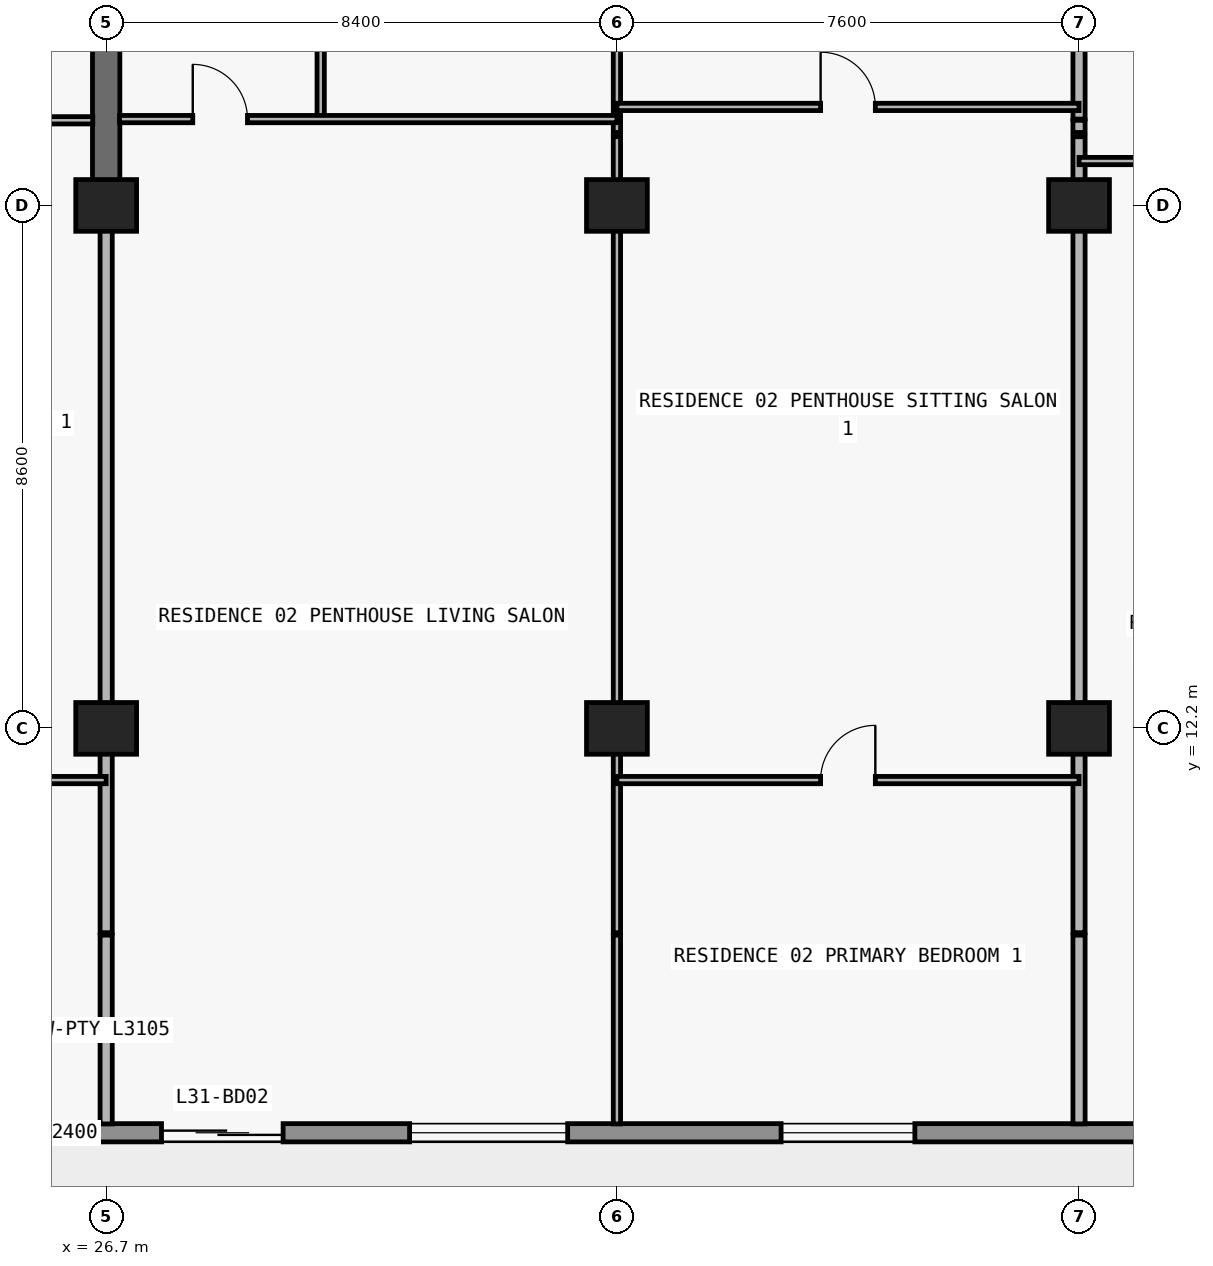
"""IFC4 building model, lengths in metres.
Left out: names, types, materials, properties, quantities, classifications, styles, units other than length and angle.
Written with IfcOpenShell. Run it as: python <this file> out.ifc"""

import sys

from ifc_helpers import new_model, si_unit, direction, frame, frame_2d, origin, origin_2d, place, context, subcontext, project, spatial, rectangle, extrude, element, fill, save


model = new_model("IFC4")
c1 = context("Model", 3, precision=1e-05, world=origin(), true_north=direction((0.0, 1.0)))
c2 = subcontext(c1, "Body", "Model", "MODEL_VIEW")
j1 = project(units=[si_unit("LENGTHUNIT", "METRE"), si_unit("PLANEANGLEUNIT", "RADIAN")], contexts=[c1])
p1 = place(None, origin())
s1 = spatial("IfcSite", under=j1, at=p1, CompositionType="ELEMENT")
p2 = place(p1, origin())
s2 = spatial("IfcBuilding", under=s1, at=p2, CompositionType="ELEMENT")
p3 = place(p2, frame((0.0, 0.0, 115.8)))
s3 = spatial("IfcBuildingStorey", under=s2, at=p3, CompositionType="ELEMENT", Elevation=115.8)
for number, where, z_axis, x_axis in (
    (1, (26.7, 12.2, 0.0), (0.0, 0.0, 1.0), (1.0, 0.0, 0.0)),
    (2, (35.1, 12.2, 0.0), (0.0, 0.0, 1.0), (1.0, 0.0, 0.0)),
    (3, (42.7, 12.2, 0.0), (0.0, 0.0, 1.0), (1.0, 0.0, 0.0)),
    (4, (26.7, 20.8, 0.0), (0.0, 0.0, 1.0), (1.0, 0.0, 0.0)),
    (5, (35.1, 20.8, 0.0), (0.0, 0.0, 1.0), (1.0, 0.0, 0.0)),
    (6, (42.7, 20.8, 0.0), (0.0, 0.0, 1.0), (1.0, 0.0, 0.0)),
):
    element("IfcColumn", number, at=place(p3, frame(where, z_axis=z_axis, x_axis=x_axis)), inside=s3, PredefinedType="COLUMN", context=c2, shape_type="SweptSolid", body=[
        extrude(rectangle(XDim=1.0, YDim=0.85, at=origin_2d()), origin(), (0.0, 0.0, 1.0), 3.05),
    ])
p4 = place(p3, frame((26.7, 20.8, 0.0), z_axis=(0.0, 0.0, 1.0), x_axis=(0.0, 1.0, 0.0)))
e7 = element("IfcWall", 7, at=p4, inside=s3, PredefinedType="SHEAR", context=c2, shape_type="SweptSolid", body=[
    extrude(rectangle(XDim=8.6, YDim=0.45, at=frame_2d((4.3, 0.0))), origin(), (0.0, 0.0, 1.0), 3.05),
])
p5 = place(p3, frame((70.1, 5.55, 0.0), z_axis=(0.0, 0.0, 1.0), x_axis=(-1.0, 0.0, 0.0)))
e8 = element("IfcWall", 8, at=p5, inside=s3, PredefinedType="STANDARD", context=c2, shape_type="SweptSolid", body=[
    extrude(rectangle(XDim=62.4, YDim=0.3, at=frame_2d((31.2, 0.0))), origin(), (0.0, 0.0, 1.0), 3.05),
])
p6 = place(p5, frame((57.29, 0.0, 0.0)))
e9 = element("IfcOpeningElement", 9, at=p6, cuts=e8, PredefinedType="OPENING", context=c2, shape_type="SweptSolid", body=[
    extrude(rectangle(XDim=2.0, YDim=2.3, at=frame_2d((1.0, 1.15))), frame((0.0, 0.16, 0.0), z_axis=(0.0, -1.0, 0.0), x_axis=(1.0, 0.0, 0.0)), (0.0, 0.0, 1.0), 0.32),
])
p7 = place(p5, frame((52.61, 0.0, 0.65)))
e10 = element("IfcOpeningElement", 10, at=p7, cuts=e8, PredefinedType="OPENING", context=c2, shape_type="SweptSolid", body=[
    extrude(rectangle(XDim=2.6, YDim=1.85, at=frame_2d((1.3, 0.925))), frame((0.0, 0.16, 0.0), z_axis=(0.0, -1.0, 0.0), x_axis=(1.0, 0.0, 0.0)), (0.0, 0.0, 1.0), 0.32),
])
p8 = place(p5, frame((46.5, 0.0, 0.85)))
e11 = element("IfcOpeningElement", 11, at=p8, cuts=e8, PredefinedType="OPENING", context=c2, shape_type="SweptSolid", body=[
    extrude(rectangle(XDim=2.2, YDim=1.55, at=frame_2d((1.1, 0.775))), frame((0.0, 0.16, 0.0), z_axis=(0.0, -1.0, 0.0), x_axis=(1.0, 0.0, 0.0)), (0.0, 0.0, 1.0), 0.32),
])
p9 = place(p5, frame((40.49, 0.0, 0.0)))
e12 = element("IfcOpeningElement", 12, at=p9, cuts=e8, PredefinedType="OPENING", context=c2, shape_type="SweptSolid", body=[
    extrude(rectangle(XDim=2.0, YDim=2.3, at=frame_2d((1.0, 1.15))), frame((0.0, 0.16, 0.0), z_axis=(0.0, -1.0, 0.0), x_axis=(1.0, 0.0, 0.0)), (0.0, 0.0, 1.0), 0.32),
])
p10 = place(p5, frame((35.81, 0.0, 0.65)))
e13 = element("IfcOpeningElement", 13, at=p10, cuts=e8, PredefinedType="OPENING", context=c2, shape_type="SweptSolid", body=[
    extrude(rectangle(XDim=2.6, YDim=1.85, at=frame_2d((1.3, 0.925))), frame((0.0, 0.16, 0.0), z_axis=(0.0, -1.0, 0.0), x_axis=(1.0, 0.0, 0.0)), (0.0, 0.0, 1.0), 0.32),
])
p11 = place(p5, frame((30.1, 0.0, 0.85)))
e14 = element("IfcOpeningElement", 14, at=p11, cuts=e8, PredefinedType="OPENING", context=c2, shape_type="SweptSolid", body=[
    extrude(rectangle(XDim=2.2, YDim=1.55, at=frame_2d((1.1, 0.775))), frame((0.0, 0.16, 0.0), z_axis=(0.0, -1.0, 0.0), x_axis=(1.0, 0.0, 0.0)), (0.0, 0.0, 1.0), 0.32),
])
p12 = place(p5, frame((24.426, 0.0, 0.0)))
e15 = element("IfcOpeningElement", 15, at=p12, cuts=e8, PredefinedType="OPENING", context=c2, shape_type="SweptSolid", body=[
    extrude(rectangle(XDim=2.0, YDim=2.3, at=frame_2d((1.0, 1.15))), frame((0.0, 0.16, 0.0), z_axis=(0.0, -1.0, 0.0), x_axis=(1.0, 0.0, 0.0)), (0.0, 0.0, 1.0), 0.32),
])
p13 = place(p5, frame((20.126, 0.0, 0.85)))
e16 = element("IfcOpeningElement", 16, at=p13, cuts=e8, PredefinedType="OPENING", context=c2, shape_type="SweptSolid", body=[
    extrude(rectangle(XDim=2.2, YDim=1.55, at=frame_2d((1.1, 0.775))), frame((0.0, 0.16, 0.0), z_axis=(0.0, -1.0, 0.0), x_axis=(1.0, 0.0, 0.0)), (0.0, 0.0, 1.0), 0.32),
])
p14 = place(p5, frame((15.69, 0.0, 0.0)))
e17 = element("IfcOpeningElement", 17, at=p14, cuts=e8, PredefinedType="OPENING", context=c2, shape_type="SweptSolid", body=[
    extrude(rectangle(XDim=2.0, YDim=2.3, at=frame_2d((1.0, 1.15))), frame((0.0, 0.16, 0.0), z_axis=(0.0, -1.0, 0.0), x_axis=(1.0, 0.0, 0.0)), (0.0, 0.0, 1.0), 0.32),
])
p15 = place(p5, frame((11.59, 0.0, 0.85)))
e18 = element("IfcOpeningElement", 18, at=p15, cuts=e8, PredefinedType="OPENING", context=c2, shape_type="SweptSolid", body=[
    extrude(rectangle(XDim=1.8, YDim=1.55, at=frame_2d((0.9, 0.775))), frame((0.0, 0.16, 0.0), z_axis=(0.0, -1.0, 0.0), x_axis=(1.0, 0.0, 0.0)), (0.0, 0.0, 1.0), 0.32),
])
p16 = place(p5, frame((7.626, 0.0, 0.0)))
e19 = element("IfcOpeningElement", 19, at=p16, cuts=e8, PredefinedType="OPENING", context=c2, shape_type="SweptSolid", body=[
    extrude(rectangle(XDim=2.0, YDim=2.3, at=frame_2d((1.0, 1.15))), frame((0.0, 0.16, 0.0), z_axis=(0.0, -1.0, 0.0), x_axis=(1.0, 0.0, 0.0)), (0.0, 0.0, 1.0), 0.32),
])
p17 = place(p5, frame((3.326, 0.0, 0.85)))
e20 = element("IfcOpeningElement", 20, at=p17, cuts=e8, PredefinedType="OPENING", context=c2, shape_type="SweptSolid", body=[
    extrude(rectangle(XDim=2.2, YDim=1.55, at=frame_2d((1.1, 0.775))), frame((0.0, 0.16, 0.0), z_axis=(0.0, -1.0, 0.0), x_axis=(1.0, 0.0, 0.0)), (0.0, 0.0, 1.0), 0.32),
])
p18 = place(p3, frame((26.7, 5.695, 0.0), z_axis=(0.0, 0.0, 1.0), x_axis=(0.0, 1.0, 0.0)))
e21 = element("IfcWall", 21, at=p18, inside=s3, PredefinedType="PARTITIONING", context=c2, shape_type="SweptSolid", body=[
    extrude(rectangle(XDim=3.105, YDim=0.2, at=frame_2d((1.552, 0.0))), origin(), (0.0, 0.0, 1.0), 3.05),
])
p19 = place(p3, frame((26.7, 8.84, 0.0), z_axis=(0.0, 0.0, 1.0), x_axis=(0.0, 1.0, 0.0)))
e22 = element("IfcWall", 22, at=p19, inside=s3, PredefinedType="PARTITIONING", context=c2, shape_type="SweptSolid", body=[
    extrude(rectangle(XDim=11.955, YDim=0.2, at=frame_2d((5.978, 0.0))), origin(), (0.0, 0.0, 1.0), 2.174),
])
p20 = place(p3, frame((30.228, 22.22, 0.0), z_axis=(0.0, 0.0, 1.0), x_axis=(0.0, 1.0, 0.0)))
e23 = element("IfcWall", 23, at=p20, inside=s3, PredefinedType="PARTITIONING", context=c2, shape_type="SweptSolid", body=[
    extrude(rectangle(XDim=4.38, YDim=0.12, at=frame_2d((2.19, 0.0))), origin(), (0.0, 0.0, 1.0), 3.05),
])
p21 = place(p20, frame((1.74, 0.0, 0.0)))
e24 = element("IfcOpeningElement", 24, at=p21, cuts=e23, PredefinedType="OPENING", context=c2, shape_type="SweptSolid", body=[
    extrude(rectangle(XDim=0.9, YDim=2.15, at=frame_2d((0.45, 1.075))), frame((0.0, 0.07, 0.0), z_axis=(0.0, -1.0, 0.0), x_axis=(1.0, 0.0, 0.0)), (0.0, 0.0, 1.0), 0.14),
])
p22 = place(p3, frame((35.1, 5.695, 0.0), z_axis=(0.0, 0.0, 1.0), x_axis=(0.0, 1.0, 0.0)))
e25 = element("IfcWall", 25, at=p22, inside=s3, PredefinedType="PARTITIONING", context=c2, shape_type="SweptSolid", body=[
    extrude(rectangle(XDim=3.105, YDim=0.12, at=frame_2d((1.552, 0.0))), origin(), (0.0, 0.0, 1.0), 3.05),
])
p23 = place(p3, frame((35.1, 8.84, 0.0), z_axis=(0.0, 0.0, 1.0), x_axis=(0.0, 1.0, 0.0)))
e26 = element("IfcWall", 26, at=p23, inside=s3, PredefinedType="PARTITIONING", context=c2, shape_type="SweptSolid", body=[
    extrude(rectangle(XDim=13.09, YDim=0.12, at=frame_2d((6.545, 0.0))), origin(), (0.0, 0.0, 1.0), 2.174),
])
p24 = place(p3, frame((35.1, 22.0, 0.0), z_axis=(0.0, 0.0, 1.0), x_axis=(0.0, 1.0, 0.0)))
e27 = element("IfcWall", 27, at=p24, inside=s3, PredefinedType="PARTITIONING", context=c2, shape_type="SweptSolid", body=[
    extrude(rectangle(XDim=0.2, YDim=0.12, at=frame_2d((0.1, 0.0))), origin(), (0.0, 0.0, 1.0), 2.174),
])
p25 = place(p3, frame((35.1, 22.22, 0.0), z_axis=(0.0, 0.0, 1.0), x_axis=(0.0, 1.0, 0.0)))
e28 = element("IfcWall", 28, at=p25, inside=s3, PredefinedType="PARTITIONING", context=c2, shape_type="SweptSolid", body=[
    extrude(rectangle(XDim=4.38, YDim=0.12, at=frame_2d((2.19, 0.0))), origin(), (0.0, 0.0, 1.0), 2.174),
])
p26 = place(p25, frame((1.84, 0.0, 0.0)))
e29 = element("IfcOpeningElement", 29, at=p26, cuts=e28, PredefinedType="OPENING", context=c2, shape_type="SweptSolid", body=[
    extrude(rectangle(XDim=0.9, YDim=2.124, at=frame_2d((0.45, 1.062))), frame((0.0, 0.07, 0.0), z_axis=(0.0, -1.0, 0.0), x_axis=(1.0, 0.0, 0.0)), (0.0, 0.0, 1.0), 0.14),
])
p27 = place(p3, frame((42.7, 5.695, 0.0), z_axis=(0.0, 0.0, 1.0), x_axis=(0.0, 1.0, 0.0)))
e30 = element("IfcWall", 30, at=p27, inside=s3, PredefinedType="PARTITIONING", context=c2, shape_type="SweptSolid", body=[
    extrude(rectangle(XDim=3.105, YDim=0.2, at=frame_2d((1.552, 0.0))), origin(), (0.0, 0.0, 1.0), 3.05),
])
p28 = place(p3, frame((42.7, 8.84, 0.0), z_axis=(0.0, 0.0, 1.0), x_axis=(0.0, 1.0, 0.0)))
e31 = element("IfcWall", 31, at=p28, inside=s3, PredefinedType="PARTITIONING", context=c2, shape_type="SweptSolid", body=[
    extrude(rectangle(XDim=13.09, YDim=0.2, at=frame_2d((6.545, 0.0))), origin(), (0.0, 0.0, 1.0), 2.174),
])
p29 = place(p3, frame((42.7, 22.0, 0.0), z_axis=(0.0, 0.0, 1.0), x_axis=(0.0, 1.0, 0.0)))
e32 = element("IfcWall", 32, at=p29, inside=s3, PredefinedType="PARTITIONING", context=c2, shape_type="SweptSolid", body=[
    extrude(rectangle(XDim=0.2, YDim=0.2, at=frame_2d((0.1, 0.0))), origin(), (0.0, 0.0, 1.0), 2.174),
])
p30 = place(p3, frame((42.7, 22.22, 0.0), z_axis=(0.0, 0.0, 1.0), x_axis=(0.0, 1.0, 0.0)))
e33 = element("IfcWall", 33, at=p30, inside=s3, PredefinedType="PARTITIONING", context=c2, shape_type="SweptSolid", body=[
    extrude(rectangle(XDim=4.38, YDim=0.2, at=frame_2d((2.19, 0.0))), origin(), (0.0, 0.0, 1.0), 2.174),
])
p31 = place(p3, frame((18.3, 11.35, 0.0), z_axis=(0.0, 0.0, 1.0), x_axis=(1.0, 0.0, 0.0)))
e34 = element("IfcWall", 34, at=p31, inside=s3, PredefinedType="PARTITIONING", context=c2, shape_type="SweptSolid", body=[
    extrude(rectangle(XDim=8.4, YDim=0.12, at=frame_2d((4.2, 0.0))), origin(), (0.0, 0.0, 1.0), 3.05),
])
p32 = place(p31, frame((3.75, 0.0, 0.0)))
e35 = element("IfcOpeningElement", 35, at=p32, cuts=e34, PredefinedType="OPENING", context=c2, shape_type="SweptSolid", body=[
    extrude(rectangle(XDim=0.9, YDim=2.15, at=frame_2d((0.45, 1.075))), frame((0.0, 0.07, 0.0), z_axis=(0.0, -1.0, 0.0), x_axis=(1.0, 0.0, 0.0)), (0.0, 0.0, 1.0), 0.14),
])
p33 = place(p3, frame((35.1, 11.35, 0.0), z_axis=(0.0, 0.0, 1.0), x_axis=(1.0, 0.0, 0.0)))
e36 = element("IfcWall", 36, at=p33, inside=s3, PredefinedType="PARTITIONING", context=c2, shape_type="SweptSolid", body=[
    extrude(rectangle(XDim=7.6, YDim=0.12, at=frame_2d((3.8, 0.0))), origin(), (0.0, 0.0, 1.0), 3.05),
])
p34 = place(p33, frame((3.35, 0.0, 0.0)))
e37 = element("IfcOpeningElement", 37, at=p34, cuts=e36, PredefinedType="OPENING", context=c2, shape_type="SweptSolid", body=[
    extrude(rectangle(XDim=0.9, YDim=2.15, at=frame_2d((0.45, 1.075))), frame((0.0, 0.07, 0.0), z_axis=(0.0, -1.0, 0.0), x_axis=(1.0, 0.0, 0.0)), (0.0, 0.0, 1.0), 0.14),
])
p35 = place(p3, frame((42.7, 21.53, 0.0), z_axis=(0.0, 0.0, 1.0), x_axis=(1.0, 0.0, 0.0)))
e38 = element("IfcWall", 38, at=p35, inside=s3, PredefinedType="PARTITIONING", context=c2, shape_type="SweptSolid", body=[
    extrude(rectangle(XDim=8.18, YDim=0.12, at=frame_2d((4.09, 0.0))), origin(), (0.0, 0.0, 1.0), 3.05),
])
p36 = place(p35, frame((1.524, 0.0, 0.0)))
e39 = element("IfcOpeningElement", 39, at=p36, cuts=e38, PredefinedType="OPENING", context=c2, shape_type="SweptSolid", body=[
    extrude(rectangle(XDim=0.9, YDim=2.15, at=frame_2d((0.45, 1.075))), frame((0.0, 0.07, 0.0), z_axis=(0.0, -1.0, 0.0), x_axis=(1.0, 0.0, 0.0)), (0.0, 0.0, 1.0), 0.14),
])
p37 = place(p35, frame((5.783, 0.0, 0.0)))
e40 = element("IfcOpeningElement", 40, at=p37, cuts=e38, PredefinedType="OPENING", context=c2, shape_type="SweptSolid", body=[
    extrude(rectangle(XDim=0.9, YDim=2.15, at=frame_2d((0.45, 1.075))), frame((0.0, 0.07, 0.0), z_axis=(0.0, -1.0, 0.0), x_axis=(1.0, 0.0, 0.0)), (0.0, 0.0, 1.0), 0.14),
])
p38 = place(p3, frame((18.3, 22.2, 0.0), z_axis=(0.0, 0.0, 1.0), x_axis=(1.0, 0.0, 0.0)))
e41 = element("IfcWall", 41, at=p38, inside=s3, PredefinedType="PARTITIONING", context=c2, shape_type="SweptSolid", body=[
    extrude(rectangle(XDim=8.18, YDim=0.12, at=frame_2d((4.09, 0.0))), origin(), (0.0, 0.0, 1.0), 3.05),
])
p39 = place(p38, frame((3.64, 0.0, 0.0)))
e42 = element("IfcOpeningElement", 42, at=p39, cuts=e41, PredefinedType="OPENING", context=c2, shape_type="SweptSolid", body=[
    extrude(rectangle(XDim=0.9, YDim=2.15, at=frame_2d((0.45, 1.075))), frame((0.0, 0.07, 0.0), z_axis=(0.0, -1.0, 0.0), x_axis=(1.0, 0.0, 0.0)), (0.0, 0.0, 1.0), 0.14),
])
p40 = place(p3, frame((26.92, 22.22, 0.0), z_axis=(0.0, 0.0, 1.0), x_axis=(1.0, 0.0, 0.0)))
e43 = element("IfcWall", 43, at=p40, inside=s3, PredefinedType="PARTITIONING", context=c2, shape_type="SweptSolid", body=[
    extrude(rectangle(XDim=8.18, YDim=0.12, at=frame_2d((4.09, 0.0))), origin(), (0.0, 0.0, 1.0), 3.05),
])
p41 = place(p40, frame((1.204, 0.0, 0.0)))
e44 = element("IfcOpeningElement", 44, at=p41, cuts=e43, PredefinedType="OPENING", context=c2, shape_type="SweptSolid", body=[
    extrude(rectangle(XDim=0.9, YDim=2.15, at=frame_2d((0.45, 1.075))), frame((0.0, 0.07, 0.0), z_axis=(0.0, -1.0, 0.0), x_axis=(1.0, 0.0, 0.0)), (0.0, 0.0, 1.0), 0.14),
])
p42 = place(p3, frame((35.1, 22.42, 0.0), z_axis=(0.0, 0.0, 1.0), x_axis=(1.0, 0.0, 0.0)))
e45 = element("IfcWall", 45, at=p42, inside=s3, PredefinedType="PARTITIONING", context=c2, shape_type="SweptSolid", body=[
    extrude(rectangle(XDim=7.6, YDim=0.12, at=frame_2d((3.8, 0.0))), origin(), (0.0, 0.0, 1.0), 3.05),
])
p43 = place(p42, frame((3.35, 0.0, 0.0)))
e46 = element("IfcOpeningElement", 46, at=p43, cuts=e45, PredefinedType="OPENING", context=c2, shape_type="SweptSolid", body=[
    extrude(rectangle(XDim=0.9, YDim=2.15, at=frame_2d((0.45, 1.075))), frame((0.0, 0.07, 0.0), z_axis=(0.0, -1.0, 0.0), x_axis=(1.0, 0.0, 0.0)), (0.0, 0.0, 1.0), 0.14),
])
p44 = place(p9, origin())
e47 = element("IfcDoor", 47, at=p44, inside=s3, OperationType="DOUBLE_DOOR_SLIDING", PredefinedType="DOOR", context=c2, shape_type="SweptSolid", body=[
    extrude(rectangle(XDim=2.0, YDim=2.3, at=frame_2d((1.0, 1.15))), frame((0.0, 0.025, 0.0), z_axis=(0.0, -1.0, 0.0), x_axis=(1.0, 0.0, 0.0)), (0.0, 0.0, 1.0), 0.05),
])
fill(e12, e47)
p45 = place(p10, origin())
e48 = element("IfcWindow", 48, at=p45, inside=s3, PartitioningType="SINGLE_PANEL", PredefinedType="WINDOW", context=c2, shape_type="SweptSolid", body=[
    extrude(rectangle(XDim=2.6, YDim=1.85, at=frame_2d((1.3, 0.925))), frame((0.0, 0.03, 0.0), z_axis=(0.0, -1.0, 0.0), x_axis=(1.0, 0.0, 0.0)), (0.0, 0.0, 1.0), 0.06),
])
fill(e13, e48)
p46 = place(p11, origin())
e49 = element("IfcWindow", 49, at=p46, inside=s3, PartitioningType="SINGLE_PANEL", PredefinedType="WINDOW", context=c2, shape_type="SweptSolid", body=[
    extrude(rectangle(XDim=2.2, YDim=1.55, at=frame_2d((1.1, 0.775))), frame((0.0, 0.03, 0.0), z_axis=(0.0, -1.0, 0.0), x_axis=(1.0, 0.0, 0.0)), (0.0, 0.0, 1.0), 0.06),
])
fill(e14, e49)
p47 = place(p41, origin())
e50 = element("IfcDoor", 50, at=p47, inside=s3, OperationType="SINGLE_SWING_LEFT", PredefinedType="DOOR", context=c2, shape_type="SweptSolid", body=[
    extrude(rectangle(XDim=0.9, YDim=2.15, at=frame_2d((0.45, 1.075))), frame((0.0, 0.025, 0.0), z_axis=(0.0, -1.0, 0.0), x_axis=(1.0, 0.0, 0.0)), (0.0, 0.0, 1.0), 0.05),
])
fill(e44, e50)
p48 = place(p43, origin())
e51 = element("IfcDoor", 51, at=p48, inside=s3, OperationType="SINGLE_SWING_LEFT", PredefinedType="DOOR", context=c2, shape_type="SweptSolid", body=[
    extrude(rectangle(XDim=0.9, YDim=2.15, at=frame_2d((0.45, 1.075))), frame((0.0, 0.025, 0.0), z_axis=(0.0, -1.0, 0.0), x_axis=(1.0, 0.0, 0.0)), (0.0, 0.0, 1.0), 0.05),
])
fill(e46, e51)
p49 = place(p34, origin())
e52 = element("IfcDoor", 52, at=p49, inside=s3, OperationType="SINGLE_SWING_RIGHT", PredefinedType="DOOR", context=c2, shape_type="SweptSolid", body=[
    extrude(rectangle(XDim=0.9, YDim=2.15, at=frame_2d((0.45, 1.075))), frame((0.0, 0.025, 0.0), z_axis=(0.0, -1.0, 0.0), x_axis=(1.0, 0.0, 0.0)), (0.0, 0.0, 1.0), 0.05),
])
fill(e37, e52)
save(model, sys.argv[1])
